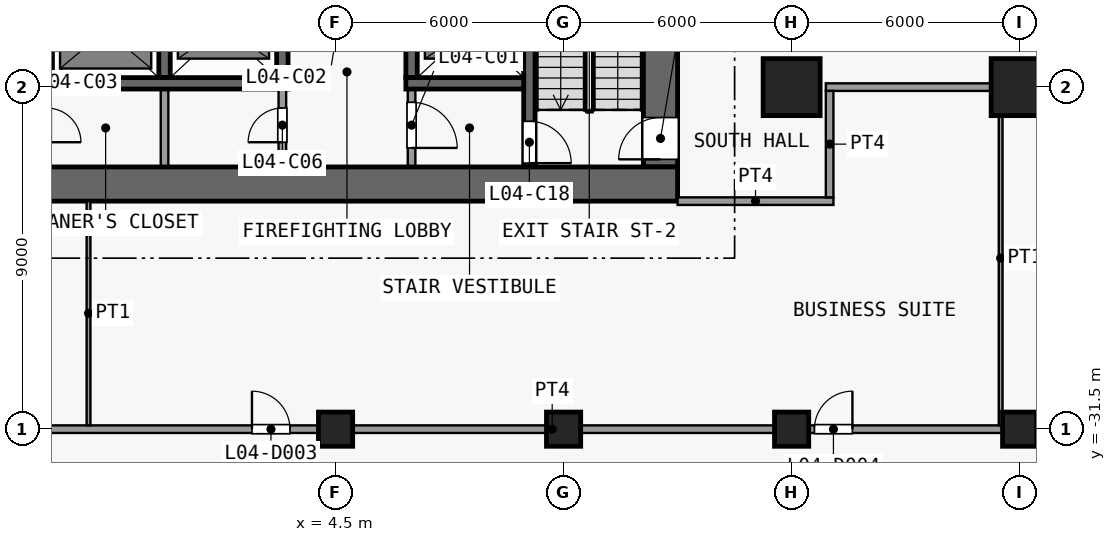
"""IFC4 building model, lengths in metres.
Left out: names, types, materials, properties, quantities, classifications, styles, units other than length and angle.
Written with IfcOpenShell. Run it as: python <this file> out.ifc"""

import sys

from ifc_helpers import new_model, si_unit, direction, frame, frame_2d, origin, origin_2d, place, context, subcontext, project, spatial, rectangle, extrude, element, fill, save


model = new_model("IFC4")
c1 = context("Model", 3, precision=1e-05, world=origin(), true_north=direction((0.0, 1.0)))
c2 = subcontext(c1, "Body", "Model", "MODEL_VIEW")
j1 = project(units=[si_unit("LENGTHUNIT", "METRE"), si_unit("PLANEANGLEUNIT", "RADIAN")], contexts=[c1])
p1 = place(None, origin())
s1 = spatial("IfcSite", under=j1, at=p1, CompositionType="ELEMENT")
p2 = place(p1, origin())
s2 = spatial("IfcBuilding", under=s1, at=p2, CompositionType="ELEMENT")
p3 = place(p2, frame((0.0, 0.0, 23.5)))
s3 = spatial("IfcBuildingStorey", under=s2, at=p3, CompositionType="ELEMENT", Elevation=23.5)
for number, where, z_axis, x_axis in (
    (1, (4.5, -31.5, 0.0), (0.0, 0.0, 1.0), (1.0, 0.0, 0.0)),
    (2, (10.5, -31.5, 0.0), (0.0, 0.0, 1.0), (1.0, 0.0, 0.0)),
    (3, (16.5, -31.5, 0.0), (0.0, 0.0, 1.0), (1.0, 0.0, 0.0)),
):
    element("IfcColumn", number, at=place(p3, frame(where, z_axis=z_axis, x_axis=x_axis)), inside=s3, PredefinedType="COLUMN", context=c2, shape_type="SweptSolid", body=[
        extrude(rectangle(XDim=0.9, YDim=0.9, at=origin_2d()), origin(), (0.0, 0.0, 1.0), 4.5),
    ])
p4 = place(p3, frame((16.5, -22.5, 0.0), z_axis=(0.0, 0.0, 1.0), x_axis=(1.0, 0.0, 0.0)))
e4 = element("IfcColumn", 4, at=p4, inside=s3, PredefinedType="COLUMN", context=c2, shape_type="SweptSolid", body=[
    extrude(rectangle(XDim=1.5, YDim=1.5, at=origin_2d()), origin(), (0.0, 0.0, 1.0), 4.5),
])
p5 = place(p3, frame((22.5, -31.5, 0.0), z_axis=(0.0, 0.0, 1.0), x_axis=(1.0, 0.0, 0.0)))
e5 = element("IfcColumn", 5, at=p5, inside=s3, PredefinedType="COLUMN", context=c2, shape_type="SweptSolid", body=[
    extrude(rectangle(XDim=0.9, YDim=0.9, at=origin_2d()), origin(), (0.0, 0.0, 1.0), 4.5),
])
p6 = place(p3, frame((22.5, -22.5, 0.0), z_axis=(0.0, 0.0, 1.0), x_axis=(1.0, 0.0, 0.0)))
e6 = element("IfcColumn", 6, at=p6, inside=s3, PredefinedType="COLUMN", context=c2, shape_type="SweptSolid", body=[
    extrude(rectangle(XDim=1.5, YDim=1.5, at=origin_2d()), origin(), (0.0, 0.0, 1.0), 4.5),
])
p7 = place(p3, frame((-13.5, -25.05, 0.0), z_axis=(0.0, 0.0, 1.0), x_axis=(1.0, 0.0, 0.0)))
e7 = element("IfcWall", 7, at=p7, inside=s3, PredefinedType="SHEAR", context=c2, shape_type="SweptSolid", body=[
    extrude(rectangle(XDim=27.0, YDim=0.9, at=frame_2d((13.5, 0.0))), origin(), (0.0, 0.0, 1.0), 4.15),
])
p8 = place(p3, frame((13.05, -24.6, 0.0), z_axis=(0.0, 0.0, 1.0), x_axis=(0.0, 1.0, 0.0)))
e8 = element("IfcWall", 8, at=p8, inside=s3, PredefinedType="SHEAR", context=c2, shape_type="SweptSolid", body=[
    extrude(rectangle(XDim=16.1, YDim=0.9, at=frame_2d((8.05, 0.0))), origin(), (0.0, 0.0, 1.0), 4.15),
])
p9 = place(p8, frame((0.2, 0.0, 0.0)))
e9 = element("IfcOpeningElement", 9, at=p9, cuts=e8, PredefinedType="OPENING", context=c2, shape_type="SweptSolid", body=[
    extrude(rectangle(XDim=1.1, YDim=2.1, at=frame_2d((0.55, 1.05))), frame((0.0, 0.46, 0.0), z_axis=(0.0, -1.0, 0.0), x_axis=(1.0, 0.0, 0.0)), (0.0, 0.0, 1.0), 0.92),
])
p10 = place(p3, frame((-2.95, -22.4, 0.0), z_axis=(0.0, 0.0, 1.0), x_axis=(1.0, 0.0, 0.0)))
e10 = element("IfcWall", 10, at=p10, inside=s3, PredefinedType="SHEAR", context=c2, shape_type="SweptSolid", body=[
    extrude(rectangle(XDim=6.2, YDim=0.3, at=frame_2d((3.1, 0.0))), origin(), (0.0, 0.0, 1.0), 4.15),
])
p11 = place(p3, frame((6.35, -22.4, 0.0), z_axis=(0.0, 0.0, 1.0), x_axis=(1.0, 0.0, 0.0)))
e11 = element("IfcWall", 11, at=p11, inside=s3, PredefinedType="SHEAR", context=c2, shape_type="SweptSolid", body=[
    extrude(rectangle(XDim=3.1, YDim=0.3, at=frame_2d((1.55, 0.0))), origin(), (0.0, 0.0, 1.0), 4.15),
])
p12 = place(p3, frame((0.0, -24.6, 0.0), z_axis=(0.0, 0.0, 1.0), x_axis=(0.0, 1.0, 0.0)))
e12 = element("IfcWall", 12, at=p12, inside=s3, PredefinedType="PARTITIONING", context=c2, shape_type="SweptSolid", body=[
    extrude(rectangle(XDim=2.05, YDim=0.2, at=frame_2d((1.025, 0.0))), origin(), (0.0, 0.0, 1.0), 4.15),
])
p13 = place(p3, frame((0.0, -22.25, 0.0), z_axis=(0.0, 0.0, 1.0), x_axis=(0.0, 1.0, 0.0)))
e13 = element("IfcWall", 13, at=p13, inside=s3, PredefinedType="SHEAR", context=c2, shape_type="SweptSolid", body=[
    extrude(rectangle(XDim=13.75, YDim=0.3, at=frame_2d((6.875, 0.0))), origin(), (0.0, 0.0, 1.0), 4.15),
])
p14 = place(p3, frame((3.1, -24.6, 0.0), z_axis=(0.0, 0.0, 1.0), x_axis=(0.0, 1.0, 0.0)))
e14 = element("IfcWall", 14, at=p14, inside=s3, PredefinedType="PARTITIONING", context=c2, shape_type="SweptSolid", body=[
    extrude(rectangle(XDim=2.05, YDim=0.2, at=frame_2d((1.025, 0.0))), origin(), (0.0, 0.0, 1.0), 4.15),
])
p15 = place(p14, frame((0.65, 0.0, 0.0)))
e15 = element("IfcOpeningElement", 15, at=p15, cuts=e14, PredefinedType="OPENING", context=c2, shape_type="SweptSolid", body=[
    extrude(rectangle(XDim=0.9, YDim=2.1, at=frame_2d((0.45, 1.05))), frame((0.0, 0.11, 0.0), z_axis=(0.0, -1.0, 0.0), x_axis=(1.0, 0.0, 0.0)), (0.0, 0.0, 1.0), 0.22),
])
p16 = place(p3, frame((3.1, -22.25, 0.0), z_axis=(0.0, 0.0, 1.0), x_axis=(0.0, 1.0, 0.0)))
e16 = element("IfcWall", 16, at=p16, inside=s3, PredefinedType="SHEAR", context=c2, shape_type="SweptSolid", body=[
    extrude(rectangle(XDim=2.85, YDim=0.3, at=frame_2d((1.425, 0.0))), origin(), (0.0, 0.0, 1.0), 4.15),
])
p17 = place(p16, frame((0.75, 0.0, 0.0)))
e17 = element("IfcOpeningElement", 17, at=p17, cuts=e16, PredefinedType="OPENING", context=c2, shape_type="SweptSolid", body=[
    extrude(rectangle(XDim=1.1, YDim=2.1, at=frame_2d((0.55, 1.05))), frame((0.0, 0.16, 0.0), z_axis=(0.0, -1.0, 0.0), x_axis=(1.0, 0.0, 0.0)), (0.0, 0.0, 1.0), 0.32),
])
p18 = place(p3, frame((6.5, -22.55, 0.0), z_axis=(0.0, 0.0, 1.0), x_axis=(0.0, -1.0, 0.0)))
e18 = element("IfcWall", 18, at=p18, inside=s3, PredefinedType="PARTITIONING", context=c2, shape_type="SweptSolid", body=[
    extrude(rectangle(XDim=2.05, YDim=0.2, at=frame_2d((1.025, 0.0))), origin(), (0.0, 0.0, 1.0), 4.15),
])
p19 = place(p18, frame((0.35, 0.0, 0.0)))
e19 = element("IfcOpeningElement", 19, at=p19, cuts=e18, PredefinedType="OPENING", context=c2, shape_type="SweptSolid", body=[
    extrude(rectangle(XDim=1.2, YDim=2.1, at=frame_2d((0.6, 1.05))), frame((0.0, 0.11, 0.0), z_axis=(0.0, -1.0, 0.0), x_axis=(1.0, 0.0, 0.0)), (0.0, 0.0, 1.0), 0.22),
])
p20 = place(p3, frame((6.5, -22.25, 0.0), z_axis=(0.0, 0.0, 1.0), x_axis=(0.0, 1.0, 0.0)))
e20 = element("IfcWall", 20, at=p20, inside=s3, PredefinedType="SHEAR", context=c2, shape_type="SweptSolid", body=[
    extrude(rectangle(XDim=2.6, YDim=0.3, at=frame_2d((1.3, 0.0))), origin(), (0.0, 0.0, 1.0), 4.15),
])
p21 = place(p20, frame((0.75, 0.0, 0.0)))
e21 = element("IfcOpeningElement", 21, at=p21, cuts=e20, PredefinedType="OPENING", context=c2, shape_type="SweptSolid", body=[
    extrude(rectangle(XDim=1.1, YDim=2.1, at=frame_2d((0.55, 1.05))), frame((0.0, 0.16, 0.0), z_axis=(0.0, -1.0, 0.0), x_axis=(1.0, 0.0, 0.0)), (0.0, 0.0, 1.0), 0.32),
])
p22 = place(p3, frame((9.6, -16.9, 0.0), z_axis=(0.0, 0.0, 1.0), x_axis=(0.0, -1.0, 0.0)))
e22 = element("IfcWall", 22, at=p22, inside=s3, PredefinedType="SHEAR", context=c2, shape_type="SweptSolid", body=[
    extrude(rectangle(XDim=7.7, YDim=0.3, at=frame_2d((3.85, 0.0))), origin(), (0.0, 0.0, 1.0), 4.15),
])
p23 = place(p22, frame((6.5, 0.0, 0.0)))
e23 = element("IfcOpeningElement", 23, at=p23, cuts=e22, PredefinedType="OPENING", context=c2, shape_type="SweptSolid", body=[
    extrude(rectangle(XDim=1.1, YDim=2.1, at=frame_2d((0.55, 1.05))), frame((0.0, 0.16, 0.0), z_axis=(0.0, -1.0, 0.0), x_axis=(1.0, 0.0, 0.0)), (0.0, 0.0, 1.0), 0.32),
])
p24 = place(p3, frame((-25.9, -31.5, 0.0), z_axis=(0.0, 0.0, 1.0), x_axis=(1.0, 0.0, 0.0)))
e24 = element("IfcWall", 24, at=p24, inside=s3, PredefinedType="PARTITIONING", context=c2, shape_type="SweptSolid", body=[
    extrude(rectangle(XDim=78.15, YDim=0.2, at=frame_2d((39.075, 0.0))), origin(), (0.0, 0.0, 1.0), 4.15),
])
p25 = place(p24, frame((4.3, 0.0, 0.0)))
e25 = element("IfcOpeningElement", 25, at=p25, cuts=e24, PredefinedType="OPENING", context=c2, shape_type="SweptSolid", body=[
    extrude(rectangle(XDim=1.0, YDim=2.1, at=frame_2d((0.5, 1.05))), frame((0.0, 0.11, 0.0), z_axis=(0.0, -1.0, 0.0), x_axis=(1.0, 0.0, 0.0)), (0.0, 0.0, 1.0), 0.22),
])
p26 = place(p24, frame((18.6, 0.0, 0.0)))
e26 = element("IfcOpeningElement", 26, at=p26, cuts=e24, PredefinedType="OPENING", context=c2, shape_type="SweptSolid", body=[
    extrude(rectangle(XDim=1.0, YDim=2.1, at=frame_2d((0.5, 1.05))), frame((0.0, 0.11, 0.0), z_axis=(0.0, -1.0, 0.0), x_axis=(1.0, 0.0, 0.0)), (0.0, 0.0, 1.0), 0.22),
])
p27 = place(p24, frame((28.2, 0.0, 0.0)))
e27 = element("IfcOpeningElement", 27, at=p27, cuts=e24, PredefinedType="OPENING", context=c2, shape_type="SweptSolid", body=[
    extrude(rectangle(XDim=1.0, YDim=2.1, at=frame_2d((0.5, 1.05))), frame((0.0, 0.11, 0.0), z_axis=(0.0, -1.0, 0.0), x_axis=(1.0, 0.0, 0.0)), (0.0, 0.0, 1.0), 0.22),
])
p28 = place(p24, frame((43.0, 0.0, 0.0)))
e28 = element("IfcOpeningElement", 28, at=p28, cuts=e24, PredefinedType="OPENING", context=c2, shape_type="SweptSolid", body=[
    extrude(rectangle(XDim=1.0, YDim=2.1, at=frame_2d((0.5, 1.05))), frame((0.0, 0.11, 0.0), z_axis=(0.0, -1.0, 0.0), x_axis=(1.0, 0.0, 0.0)), (0.0, 0.0, 1.0), 0.22),
])
p29 = place(p24, frame((51.0, 0.0, 0.0)))
e29 = element("IfcOpeningElement", 29, at=p29, cuts=e24, PredefinedType="OPENING", context=c2, shape_type="SweptSolid", body=[
    extrude(rectangle(XDim=1.0, YDim=2.1, at=frame_2d((0.5, 1.05))), frame((0.0, 0.11, 0.0), z_axis=(0.0, -1.0, 0.0), x_axis=(1.0, 0.0, 0.0)), (0.0, 0.0, 1.0), 0.22),
])
p30 = place(p24, frame((61.8, 0.0, 0.0)))
e30 = element("IfcOpeningElement", 30, at=p30, cuts=e24, PredefinedType="OPENING", context=c2, shape_type="SweptSolid", body=[
    extrude(rectangle(XDim=1.0, YDim=2.1, at=frame_2d((0.5, 1.05))), frame((0.0, 0.11, 0.0), z_axis=(0.0, -1.0, 0.0), x_axis=(1.0, 0.0, 0.0)), (0.0, 0.0, 1.0), 0.22),
])
p31 = place(p24, frame((71.5, 0.0, 0.0)))
e31 = element("IfcOpeningElement", 31, at=p31, cuts=e24, PredefinedType="OPENING", context=c2, shape_type="SweptSolid", body=[
    extrude(rectangle(XDim=1.0, YDim=2.1, at=frame_2d((0.5, 1.05))), frame((0.0, 0.11, 0.0), z_axis=(0.0, -1.0, 0.0), x_axis=(1.0, 0.0, 0.0)), (0.0, 0.0, 1.0), 0.22),
])
p32 = place(p3, frame((13.5, -25.5, 0.0), z_axis=(0.0, 0.0, 1.0), x_axis=(1.0, 0.0, 0.0)))
e32 = element("IfcWall", 32, at=p32, inside=s3, PredefinedType="PARTITIONING", context=c2, shape_type="SweptSolid", body=[
    extrude(rectangle(XDim=4.1, YDim=0.2, at=frame_2d((2.05, 0.0))), origin(), (0.0, 0.0, 1.0), 4.15),
])
p33 = place(p3, frame((17.4, -22.5, 0.0), z_axis=(0.0, 0.0, 1.0), x_axis=(1.0, 0.0, 0.0)))
e33 = element("IfcWall", 33, at=p33, inside=s3, PredefinedType="PARTITIONING", context=c2, shape_type="SweptSolid", body=[
    extrude(rectangle(XDim=14.1, YDim=0.2, at=frame_2d((7.05, 0.0))), origin(), (0.0, 0.0, 1.0), 4.15),
])
p34 = place(p3, frame((-2.0, -31.4, 0.0), z_axis=(0.0, 0.0, 1.0), x_axis=(0.0, 1.0, 0.0)))
e34 = element("IfcWall", 34, at=p34, inside=s3, PredefinedType="PARTITIONING", context=c2, shape_type="SweptSolid", body=[
    extrude(rectangle(XDim=5.9, YDim=0.1, at=frame_2d((2.95, 0.0))), origin(), (0.0, 0.0, 1.0), 4.15),
])
p35 = place(p3, frame((17.5, -25.4, 0.0), z_axis=(0.0, 0.0, 1.0), x_axis=(0.0, 1.0, 0.0)))
e35 = element("IfcWall", 35, at=p35, inside=s3, PredefinedType="PARTITIONING", context=c2, shape_type="SweptSolid", body=[
    extrude(rectangle(XDim=2.8, YDim=0.2, at=frame_2d((1.4, 0.0))), origin(), (0.0, 0.0, 1.0), 4.15),
])
p36 = place(p3, frame((22.0, -31.4, 0.0), z_axis=(0.0, 0.0, 1.0), x_axis=(0.0, 1.0, 0.0)))
e36 = element("IfcWall", 36, at=p36, inside=s3, PredefinedType="PARTITIONING", context=c2, shape_type="SweptSolid", body=[
    extrude(rectangle(XDim=8.8, YDim=0.1, at=frame_2d((4.4, 0.0))), origin(), (0.0, 0.0, 1.0), 4.15),
])
p37 = place(p19, origin())
e37 = element("IfcDoor", 37, at=p37, inside=s3, OperationType="SINGLE_SWING_RIGHT", PredefinedType="DOOR", context=c2, shape_type="SweptSolid", body=[
    extrude(rectangle(XDim=1.2, YDim=2.1, at=frame_2d((0.6, 1.05))), frame((0.0, 0.025, 0.0), z_axis=(0.0, -1.0, 0.0), x_axis=(1.0, 0.0, 0.0)), (0.0, 0.0, 1.0), 0.05),
])
fill(e19, e37)
p38 = place(p15, origin())
e38 = element("IfcDoor", 38, at=p38, inside=s3, OperationType="SINGLE_SWING_LEFT", PredefinedType="DOOR", context=c2, shape_type="SweptSolid", body=[
    extrude(rectangle(XDim=0.9, YDim=2.1, at=frame_2d((0.45, 1.05))), frame((0.0, 0.025, 0.0), z_axis=(0.0, -1.0, 0.0), x_axis=(1.0, 0.0, 0.0)), (0.0, 0.0, 1.0), 0.05),
])
fill(e15, e38)
p39 = place(p23, origin())
e39 = element("IfcDoor", 39, at=p39, inside=s3, OperationType="SINGLE_SWING_RIGHT", PredefinedType="DOOR", context=c2, shape_type="SweptSolid", body=[
    extrude(rectangle(XDim=1.1, YDim=2.1, at=frame_2d((0.55, 1.05))), frame((0.0, 0.025, 0.0), z_axis=(0.0, -1.0, 0.0), x_axis=(1.0, 0.0, 0.0)), (0.0, 0.0, 1.0), 0.05),
])
fill(e23, e39)
p40 = place(p9, origin())
e40 = element("IfcDoor", 40, at=p40, inside=s3, OperationType="SINGLE_SWING_LEFT", PredefinedType="DOOR", context=c2, shape_type="SweptSolid", body=[
    extrude(rectangle(XDim=1.1, YDim=2.1, at=frame_2d((0.55, 1.05))), frame((0.0, 0.025, 0.0), z_axis=(0.0, -1.0, 0.0), x_axis=(1.0, 0.0, 0.0)), (0.0, 0.0, 1.0), 0.05),
])
fill(e9, e40)
p41 = place(p27, origin())
e41 = element("IfcDoor", 41, at=p41, inside=s3, OperationType="SINGLE_SWING_RIGHT", PredefinedType="DOOR", context=c2, shape_type="SweptSolid", body=[
    extrude(rectangle(XDim=1.0, YDim=2.1, at=frame_2d((0.5, 1.05))), frame((0.0, 0.025, 0.0), z_axis=(0.0, -1.0, 0.0), x_axis=(1.0, 0.0, 0.0)), (0.0, 0.0, 1.0), 0.05),
])
fill(e27, e41)
p42 = place(p28, origin())
e42 = element("IfcDoor", 42, at=p42, inside=s3, OperationType="SINGLE_SWING_LEFT", PredefinedType="DOOR", context=c2, shape_type="SweptSolid", body=[
    extrude(rectangle(XDim=1.0, YDim=2.1, at=frame_2d((0.5, 1.05))), frame((0.0, 0.025, 0.0), z_axis=(0.0, -1.0, 0.0), x_axis=(1.0, 0.0, 0.0)), (0.0, 0.0, 1.0), 0.05),
])
fill(e28, e42)
save(model, sys.argv[1])
